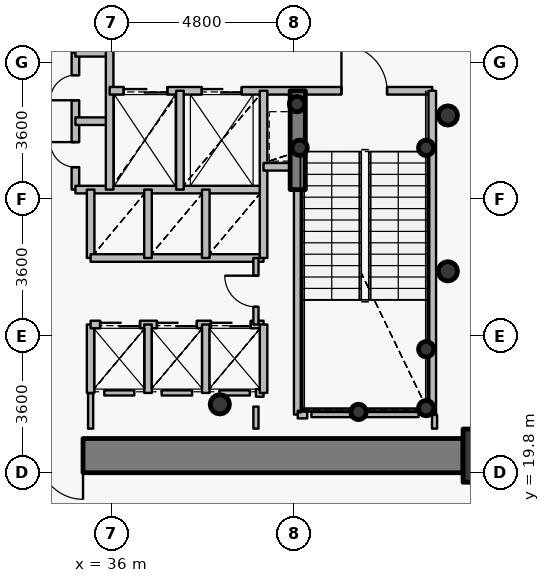
"""IFC4 building model, lengths in metres.
Left out: names, types, materials, properties, quantities, classifications, styles, units other than length and angle.
Written with IfcOpenShell. Run it as: python <this file> out.ifc"""

import sys

from ifc_helpers import new_model, si_unit, direction, frame, frame_2d, origin, origin_2d, place, context, subcontext, project, spatial, rectangle, hollow_circle, extrude, source, transform, mapped, element, fill, save


model = new_model("IFC4")
c1 = context("Model", 3, precision=1e-05, world=origin(), true_north=direction((0.0, 1.0)))
c2 = subcontext(c1, "Body", "Model", "MODEL_VIEW")
j1 = project(units=[si_unit("LENGTHUNIT", "METRE"), si_unit("PLANEANGLEUNIT", "RADIAN")], contexts=[c1])
p1 = place(None, origin())
s1 = spatial("IfcSite", under=j1, at=p1, CompositionType="ELEMENT")
p2 = place(p1, origin())
s2 = spatial("IfcBuilding", under=s1, at=p2, CompositionType="ELEMENT")
p3 = place(p2, frame((0.0, 0.0, 70.2)))
s3 = spatial("IfcBuildingStorey", under=s2, at=p3, CompositionType="ELEMENT", Elevation=70.2)
p4 = place(p3, frame((45.95, 20.25, 0.0), z_axis=(0.0, 0.0, 1.0), x_axis=(1.0, 0.0, 0.0)))
e1 = element("IfcColumn", 1, at=p4, inside=s3, PredefinedType="COLUMN", context=c2, shape_type="SweptSolid", body=[
    extrude(rectangle(XDim=1.4, YDim=1.4, at=origin_2d()), origin(), (0.0, 0.0, 1.0), 4.2),
])
p5 = place(p3, frame((38.85, 21.6, 0.0), z_axis=(0.0, 0.0, 1.0), x_axis=(1.0, 0.0, 0.0)))
e2 = element("IfcColumn", 2, at=p5, inside=s3, PredefinedType="COLUMN", context=c2, shape_type="SweptSolid", body=[
    extrude(hollow_circle(Radius=0.254, WallThickness=0.02, at=origin_2d()), origin(), (0.0, 0.0, 1.0), 4.2),
])
for number, where, z_axis, x_axis in (
    (3, (44.28, 21.5, 0.0), (0.0, 0.0, 1.0), (1.0, 0.0, 0.0)),
    (4, (44.28, 23.05, 0.0), (0.0, 0.0, 1.0), (1.0, 0.0, 0.0)),
    (5, (42.5, 21.4, 0.0), (0.0, 0.0, 1.0), (1.0, 0.0, 0.0)),
    (6, (40.95, 28.35, 0.0), (0.0, 0.0, 1.0), (1.0, 0.0, 0.0)),
    (7, (44.28, 28.35, 0.0), (0.0, 0.0, 1.0), (1.0, 0.0, 0.0)),
    (8, (40.88, 29.5, 0.0), (0.0, 0.0, 1.0), (1.0, 0.0, 0.0)),
):
    element("IfcColumn", number, at=place(p3, frame(where, z_axis=z_axis, x_axis=x_axis)), inside=s3, PredefinedType="COLUMN", context=c2, shape_type="SweptSolid", body=[
        extrude(hollow_circle(Radius=0.203, WallThickness=0.016, at=origin_2d()), origin(), (0.0, 0.0, 1.0), 4.2),
    ])
p6 = place(p3, frame((45.25, 20.25, 0.0), z_axis=(0.0, 0.0, 1.0), x_axis=(-1.0, 0.0, 0.0)))
e9 = element("IfcWall", 9, at=p6, inside=s3, PredefinedType="SHEAR", context=c2, shape_type="SweptSolid", body=[
    extrude(rectangle(XDim=18.5, YDim=0.9, at=frame_2d((9.25, 0.0))), origin(), (0.0, 0.0, 1.0), 3.4),
])
p7 = place(p6, frame((10.0, 0.0, 0.0)))
e10 = element("IfcOpeningElement", 10, at=p7, cuts=e9, PredefinedType="OPENING", context=c2, shape_type="SweptSolid", body=[
    extrude(rectangle(XDim=1.15, YDim=2.15, at=origin_2d()), frame((0.575, 0.46, 1.075), z_axis=(0.0, -1.0, 0.0), x_axis=(1.0, 0.0, 0.0)), (0.0, 0.0, 1.0), 0.92),
])
p8 = place(p3, frame((40.9, 27.25, 0.0), z_axis=(0.0, 0.0, 1.0), x_axis=(0.0, 1.0, 0.0)))
e11 = element("IfcWall", 11, at=p8, inside=s3, PredefinedType="SHEAR", context=c2, shape_type="SweptSolid", body=[
    extrude(rectangle(XDim=2.6, YDim=0.4, at=frame_2d((1.3, 0.0))), origin(), (0.0, 0.0, 1.0), 3.55),
])
for number, where, z_axis, x_axis in (
    (12, (44.85, 25.1, 0.0), (0.0, 0.0, 1.0), (1.0, 0.0, 0.0)),
    (13, (44.85, 29.2, 0.0), (0.0, 0.0, 1.0), (1.0, 0.0, 0.0)),
):
    element("IfcColumn", number, at=place(p3, frame(where, z_axis=z_axis, x_axis=x_axis)), inside=s3, PredefinedType="COLUMN", context=c2, shape_type="SweptSolid", body=[
        extrude(hollow_circle(Radius=0.254, WallThickness=0.02, at=origin_2d()), origin(), (0.0, 0.0, 1.0), 4.2),
    ])
p9 = place(p3, frame((35.05, 27.25, 0.0), z_axis=(0.0, 0.0, 1.0), x_axis=(0.0, 1.0, 0.0)))
e14 = element("IfcWall", 14, at=p9, inside=s3, PredefinedType="PARTITIONING", context=c2, shape_type="SweptSolid", body=[
    extrude(rectangle(XDim=3.6, YDim=0.2, at=frame_2d((1.8, 0.0))), origin(), (0.0, 0.0, 1.0), 3.95),
])
p10 = place(p9, frame((0.59, 0.0, 0.0)))
e15 = element("IfcOpeningElement", 15, at=p10, cuts=e14, PredefinedType="OPENING", context=c2, shape_type="SweptSolid", body=[
    extrude(rectangle(XDim=0.66, YDim=2.05, at=origin_2d()), frame((0.33, 0.11, 1.025), z_axis=(0.0, -1.0, 0.0), x_axis=(1.0, 0.0, 0.0)), (0.0, 0.0, 1.0), 0.22),
])
p11 = place(p9, frame((2.35, 0.0, 0.0)))
e16 = element("IfcOpeningElement", 16, at=p11, cuts=e14, PredefinedType="OPENING", context=c2, shape_type="SweptSolid", body=[
    extrude(rectangle(XDim=0.66, YDim=2.05, at=origin_2d()), frame((0.33, 0.11, 1.025), z_axis=(0.0, -1.0, 0.0), x_axis=(1.0, 0.0, 0.0)), (0.0, 0.0, 1.0), 0.22),
])
p12 = place(p3, frame((35.05, 27.25, 0.0), z_axis=(0.0, 0.0, 1.0), x_axis=(1.0, 0.0, 0.0)))
e17 = element("IfcWall", 17, at=p12, inside=s3, PredefinedType="PARTITIONING", context=c2, shape_type="SweptSolid", body=[
    extrude(rectangle(XDim=4.95, YDim=0.2, at=frame_2d((2.475, 0.0))), origin(), (0.0, 0.0, 1.0), 3.535),
])
for number, where, z_axis, x_axis in (
    (18, (35.05, 29.05, 0.0), (0.0, 0.0, 1.0), (1.0, 0.0, 0.0)),
    (19, (35.05, 30.85, 0.0), (0.0, 0.0, 1.0), (1.0, 0.0, 0.0)),
):
    element("IfcWall", number, at=place(p3, frame(where, z_axis=z_axis, x_axis=x_axis)), inside=s3, PredefinedType="PARTITIONING", context=c2, shape_type="SweptSolid", body=[
        extrude(rectangle(XDim=0.9, YDim=0.2, at=frame_2d((0.45, 0.0))), origin(), (0.0, 0.0, 1.0), 3.95),
    ])
p13 = place(p3, frame((35.45, 21.9, 0.0), z_axis=(0.0, 0.0, 1.0), x_axis=(0.0, 1.0, 0.0)))
e20 = element("IfcWall", 20, at=p13, inside=s3, PredefinedType="PARTITIONING", context=c2, shape_type="SweptSolid", body=[
    extrude(rectangle(XDim=1.8, YDim=0.2, at=frame_2d((0.9, 0.0))), origin(), (0.0, 0.0, 1.0), 3.95),
])
p14 = place(p3, frame((35.45, 23.7, 0.0), z_axis=(0.0, 0.0, 1.0), x_axis=(1.0, 0.0, 0.0)))
e21 = element("IfcWall", 21, at=p14, inside=s3, PredefinedType="PARTITIONING", context=c2, shape_type="SweptSolid", body=[
    extrude(rectangle(XDim=4.55, YDim=0.2, at=frame_2d((2.275, 0.0))), origin(), (0.0, 0.0, 1.0), 3.535),
])
p15 = place(p14, frame((0.25, 0.0, 0.0)))
e22 = element("IfcOpeningElement", 22, at=p15, cuts=e21, PredefinedType="OPENING", context=c2, shape_type="SweptSolid", body=[
    extrude(rectangle(XDim=1.05, YDim=2.15, at=origin_2d()), frame((0.525, 0.11, 1.075), z_axis=(0.0, -1.0, 0.0), x_axis=(1.0, 0.0, 0.0)), (0.0, 0.0, 1.0), 0.22),
])
p16 = place(p14, frame((1.745, 0.0, 0.0)))
e23 = element("IfcOpeningElement", 23, at=p16, cuts=e21, PredefinedType="OPENING", context=c2, shape_type="SweptSolid", body=[
    extrude(rectangle(XDim=1.05, YDim=2.15, at=origin_2d()), frame((0.525, 0.11, 1.075), z_axis=(0.0, -1.0, 0.0), x_axis=(1.0, 0.0, 0.0)), (0.0, 0.0, 1.0), 0.22),
])
p17 = place(p14, frame((3.165, 0.0, 0.0)))
e24 = element("IfcOpeningElement", 24, at=p17, cuts=e21, PredefinedType="OPENING", context=c2, shape_type="SweptSolid", body=[
    extrude(rectangle(XDim=1.05, YDim=2.15, at=origin_2d()), frame((0.525, 0.11, 1.075), z_axis=(0.0, -1.0, 0.0), x_axis=(1.0, 0.0, 0.0)), (0.0, 0.0, 1.0), 0.22),
])
p18 = place(p3, frame((35.45, 25.45, 0.0), z_axis=(0.0, 0.0, 1.0), x_axis=(0.0, 1.0, 0.0)))
e25 = element("IfcWall", 25, at=p18, inside=s3, PredefinedType="PARTITIONING", context=c2, shape_type="SweptSolid", body=[
    extrude(rectangle(XDim=1.8, YDim=0.2, at=frame_2d((0.9, 0.0))), origin(), (0.0, 0.0, 1.0), 3.95),
])
p19 = place(p3, frame((35.45, 25.45, 0.0), z_axis=(0.0, 0.0, 1.0), x_axis=(1.0, 0.0, 0.0)))
e26 = element("IfcWall", 26, at=p19, inside=s3, PredefinedType="PARTITIONING", context=c2, shape_type="SweptSolid", body=[
    extrude(rectangle(XDim=4.55, YDim=0.2, at=frame_2d((2.275, 0.0))), origin(), (0.0, 0.0, 1.0), 3.535),
])
p20 = place(p3, frame((35.95, 27.25, 0.0), z_axis=(0.0, 0.0, 1.0), x_axis=(0.0, 1.0, 0.0)))
e27 = element("IfcWall", 27, at=p20, inside=s3, PredefinedType="PARTITIONING", context=c2, shape_type="SweptSolid", body=[
    extrude(rectangle(XDim=3.8, YDim=0.2, at=frame_2d((1.9, 0.0))), origin(), (0.0, 0.0, 1.0), 3.95),
])
p21 = place(p3, frame((35.95, 29.85, 0.0), z_axis=(0.0, 0.0, 1.0), x_axis=(1.0, 0.0, 0.0)))
e28 = element("IfcWall", 28, at=p21, inside=s3, PredefinedType="PARTITIONING", context=c2, shape_type="SweptSolid", body=[
    extrude(rectangle(XDim=8.49, YDim=0.2, at=frame_2d((4.245, 0.0))), origin(), (0.0, 0.0, 1.0), 3.535),
])
p22 = place(p21, frame((6.1, 0.0, 0.0)))
e29 = element("IfcOpeningElement", 29, at=p22, cuts=e28, PredefinedType="OPENING", context=c2, shape_type="SweptSolid", body=[
    extrude(rectangle(XDim=1.2, YDim=2.15, at=origin_2d()), frame((0.6, 0.11, 1.075), z_axis=(0.0, -1.0, 0.0), x_axis=(1.0, 0.0, 0.0)), (0.0, 0.0, 1.0), 0.22),
])
p23 = place(p21, frame((0.37, 0.0, 0.0)))
e30 = element("IfcOpeningElement", 30, at=p23, cuts=e28, PredefinedType="OPENING", context=c2, shape_type="SweptSolid", body=[
    extrude(rectangle(XDim=1.15, YDim=2.15, at=origin_2d()), frame((0.575, 0.11, 1.075), z_axis=(0.0, -1.0, 0.0), x_axis=(1.0, 0.0, 0.0)), (0.0, 0.0, 1.0), 0.22),
])
p24 = place(p21, frame((2.425, 0.0, 0.0)))
e31 = element("IfcOpeningElement", 31, at=p24, cuts=e28, PredefinedType="OPENING", context=c2, shape_type="SweptSolid", body=[
    extrude(rectangle(XDim=1.05, YDim=2.15, at=origin_2d()), frame((0.525, 0.11, 1.075), z_axis=(0.0, -1.0, 0.0), x_axis=(1.0, 0.0, 0.0)), (0.0, 0.0, 1.0), 0.22),
])
for number, where, z_axis, x_axis in (
    (32, (36.96, 21.9, 0.0), (0.0, 0.0, 1.0), (0.0, 1.0, 0.0)),
    (33, (36.96, 25.45, 0.0), (0.0, 0.0, 1.0), (0.0, 1.0, 0.0)),
):
    element("IfcWall", number, at=place(p3, frame(where, z_axis=z_axis, x_axis=x_axis)), inside=s3, PredefinedType="PARTITIONING", context=c2, shape_type="SweptSolid", body=[
        extrude(rectangle(XDim=1.8, YDim=0.2, at=frame_2d((0.9, 0.0))), origin(), (0.0, 0.0, 1.0), 3.95),
    ])
p25 = place(p3, frame((37.8, 27.25, 0.0), z_axis=(0.0, 0.0, 1.0), x_axis=(0.0, 1.0, 0.0)))
e34 = element("IfcWall", 34, at=p25, inside=s3, PredefinedType="PARTITIONING", context=c2, shape_type="SweptSolid", body=[
    extrude(rectangle(XDim=2.6, YDim=0.2, at=frame_2d((1.3, 0.0))), origin(), (0.0, 0.0, 1.0), 3.95),
])
for number, where, z_axis, x_axis in (
    (35, (38.48, 21.9, 0.0), (0.0, 0.0, 1.0), (0.0, 1.0, 0.0)),
    (36, (38.48, 25.45, 0.0), (0.0, 0.0, 1.0), (0.0, 1.0, 0.0)),
):
    element("IfcWall", number, at=place(p3, frame(where, z_axis=z_axis, x_axis=x_axis)), inside=s3, PredefinedType="PARTITIONING", context=c2, shape_type="SweptSolid", body=[
        extrude(rectangle(XDim=1.8, YDim=0.2, at=frame_2d((0.9, 0.0))), origin(), (0.0, 0.0, 1.0), 3.95),
    ])
p26 = place(p3, frame((39.8, 21.9, 0.0), z_axis=(0.0, 0.0, 1.0), x_axis=(1.0, 0.0, 0.0)))
e37 = element("IfcWall", 37, at=p26, inside=s3, PredefinedType="PARTITIONING", context=c2, shape_type="SweptSolid", body=[
    extrude(rectangle(XDim=0.2, YDim=0.2, at=frame_2d((0.1, 0.0))), origin(), (0.0, 0.0, 1.0), 3.95),
])
p27 = place(p3, frame((39.8, 23.7, 0.0), z_axis=(0.0, 0.0, 1.0), x_axis=(0.0, 1.0, 0.0)))
e38 = element("IfcWall", 38, at=p27, inside=s3, PredefinedType="PARTITIONING", context=c2, shape_type="SweptSolid", body=[
    extrude(rectangle(XDim=1.75, YDim=0.135, at=frame_2d((0.875, 0.0))), origin(), (0.0, 0.0, 1.0), 3.95),
])
p28 = place(p27, frame((0.465, 0.0, 0.0)))
e39 = element("IfcOpeningElement", 39, at=p28, cuts=e38, PredefinedType="OPENING", context=c2, shape_type="SweptSolid", body=[
    extrude(rectangle(XDim=0.82, YDim=2.1, at=origin_2d()), frame((0.41, 0.078, 1.05), z_axis=(0.0, -1.0, 0.0), x_axis=(1.0, 0.0, 0.0)), (0.0, 0.0, 1.0), 0.155),
])
p29 = place(p3, frame((40.0, 21.9, 0.0), z_axis=(0.0, 0.0, 1.0), x_axis=(0.0, 1.0, 0.0)))
e40 = element("IfcWall", 40, at=p29, inside=s3, PredefinedType="PARTITIONING", context=c2, shape_type="SweptSolid", body=[
    extrude(rectangle(XDim=1.8, YDim=0.2, at=frame_2d((0.9, 0.0))), origin(), (0.0, 0.0, 1.0), 3.95),
])
p30 = place(p3, frame((40.0, 25.45, 0.0), z_axis=(0.0, 0.0, 1.0), x_axis=(0.0, 1.0, 0.0)))
e41 = element("IfcWall", 41, at=p30, inside=s3, PredefinedType="PARTITIONING", context=c2, shape_type="SweptSolid", body=[
    extrude(rectangle(XDim=4.4, YDim=0.2, at=frame_2d((2.2, 0.0))), origin(), (0.0, 0.0, 1.0), 3.95),
])
p31 = place(p3, frame((40.0, 27.85, 0.0), z_axis=(0.0, 0.0, 1.0), x_axis=(1.0, 0.0, 0.0)))
e42 = element("IfcWall", 42, at=p31, inside=s3, PredefinedType="PARTITIONING", context=c2, shape_type="SweptSolid", body=[
    extrude(rectangle(XDim=0.9, YDim=0.2, at=frame_2d((0.45, 0.0))), origin(), (0.0, 0.0, 1.0), 3.95),
])
p32 = place(p3, frame((40.9, 21.33, 0.0), z_axis=(0.0, 0.0, 1.0), x_axis=(0.0, 1.0, 0.0)))
e43 = element("IfcWall", 43, at=p32, inside=s3, PredefinedType="PARTITIONING", context=c2, shape_type="SweptSolid", body=[
    extrude(rectangle(XDim=5.91, YDim=0.2, at=frame_2d((2.955, 0.0))), origin(), (0.0, 0.0, 1.0), 3.485),
])
p33 = place(p3, frame((40.9, 21.33, 0.0), z_axis=(0.0, 0.0, 1.0), x_axis=(1.0, 0.0, 0.0)))
e44 = element("IfcWall", 44, at=p33, inside=s3, PredefinedType="PARTITIONING", context=c2, shape_type="SweptSolid", body=[
    extrude(rectangle(XDim=0.25, YDim=0.2, at=frame_2d((0.125, 0.0))), origin(), (0.0, 0.0, 1.0), 3.485),
])
p34 = place(p3, frame((44.44, 21.33, 0.0), z_axis=(0.0, 0.0, 1.0), x_axis=(0.0, 1.0, 0.0)))
e45 = element("IfcWall", 45, at=p34, inside=s3, PredefinedType="PARTITIONING", context=c2, shape_type="SweptSolid", body=[
    extrude(rectangle(XDim=8.52, YDim=0.2, at=frame_2d((4.26, 0.0))), origin(), (0.0, 0.0, 1.0), 3.95),
])
p35 = place(p3, frame((44.08, 21.33, 0.0), z_axis=(0.0, 0.0, 1.0), x_axis=(-1.0, 0.0, 0.0)))
e46 = element("IfcWall", 46, at=p35, inside=s3, PredefinedType="PARTITIONING", context=c2, shape_type="SweptSolid", body=[
    extrude(rectangle(XDim=2.82, YDim=0.135, at=frame_2d((1.41, 0.0))), origin(), (0.0, 0.0, 1.0), 3.485),
])
p36 = place(p3, frame((36.6, 21.9, 0.0), z_axis=(0.0, 0.0, 1.0), x_axis=(-1.0, 0.0, 0.0)))
e47 = element("IfcWall", 47, at=p36, inside=s3, PredefinedType="PARTITIONING", context=c2, shape_type="SweptSolid", body=[
    extrude(rectangle(XDim=0.79, YDim=0.135, at=frame_2d((0.395, 0.0))), origin(), (0.0, 0.0, 1.0), 3.95),
])
p37 = place(p3, frame((38.12, 21.9, 0.0), z_axis=(0.0, 0.0, 1.0), x_axis=(-1.0, 0.0, 0.0)))
e48 = element("IfcWall", 48, at=p37, inside=s3, PredefinedType="PARTITIONING", context=c2, shape_type="SweptSolid", body=[
    extrude(rectangle(XDim=0.8, YDim=0.135, at=frame_2d((0.4, 0.0))), origin(), (0.0, 0.0, 1.0), 3.95),
])
p38 = place(p3, frame((39.64, 21.9, 0.0), z_axis=(0.0, 0.0, 1.0), x_axis=(-1.0, 0.0, 0.0)))
e49 = element("IfcWall", 49, at=p38, inside=s3, PredefinedType="PARTITIONING", context=c2, shape_type="SweptSolid", body=[
    extrude(rectangle(XDim=0.8, YDim=0.135, at=frame_2d((0.4, 0.0))), origin(), (0.0, 0.0, 1.0), 3.535),
])
p39 = place(p3, frame((39.8, 20.96, 0.0), z_axis=(0.0, 0.0, 1.0), x_axis=(0.0, 1.0, 0.0)))
e50 = element("IfcWall", 50, at=p39, inside=s3, PredefinedType="PARTITIONING", context=c2, shape_type="SweptSolid", body=[
    extrude(rectangle(XDim=0.58, YDim=0.135, at=frame_2d((0.29, 0.0))), origin(), (0.0, 0.0, 1.0), 3.485),
])
p40 = place(p3, frame((44.5, 20.96, 0.0), z_axis=(0.0, 0.0, 1.0), x_axis=(0.0, 1.0, 0.0)))
e51 = element("IfcWall", 51, at=p40, inside=s3, PredefinedType="PARTITIONING", context=c2, shape_type="SweptSolid", body=[
    extrude(rectangle(XDim=0.36, YDim=0.135, at=frame_2d((0.18, 0.0))), origin(), (0.0, 0.0, 1.0), 3.95),
])
p41 = place(p3, frame((35.45, 21.89, 0.0), z_axis=(0.0, 0.0, 1.0), x_axis=(0.0, -1.0, 0.0)))
e52 = element("IfcWall", 52, at=p41, inside=s3, PredefinedType="PARTITIONING", context=c2, shape_type="SweptSolid", body=[
    extrude(rectangle(XDim=0.93, YDim=0.135, at=frame_2d((0.465, 0.0))), origin(), (0.0, 0.0, 1.0), 3.535),
])
p42 = place(p3, frame((45.26, 19.8, 0.0), z_axis=(0.0, 0.0, 1.0), x_axis=(1.0, 0.0, 0.0)))
e53 = element("IfcWall", 53, at=p42, inside=s3, PredefinedType="PARTITIONING", context=c2, shape_type="SweptSolid", body=[
    extrude(rectangle(XDim=1.14, YDim=0.135, at=frame_2d((0.57, 0.0))), origin(), (0.0, 0.0, 1.0), 3.285),
])
m1 = source(origin(), c2, "Body", "SweptSolid", [
    extrude(rectangle(XDim=1.15, YDim=2.15, at=origin_2d()), frame((0.575, 0.025, 1.075), z_axis=(0.0, -1.0, 0.0), x_axis=(1.0, 0.0, 0.0)), (0.0, 0.0, 1.0), 0.05),
])
p43 = place(p7, origin())
e54 = element("IfcDoor", 54, at=p43, inside=s3, OperationType="SINGLE_SWING_LEFT", PredefinedType="DOOR", context=c2, shape_type="MappedRepresentation", body=[
    mapped(m1, transform((0.0, 0.0, 0.0), x_axis=(1.0, 0.0, 0.0), y_axis=(0.0, 1.0, 0.0), z_axis=(0.0, 0.0, 1.0), scale=1.0)),
])
fill(e10, e54)
m2 = source(origin(), c2, "Body", "SweptSolid", [
    extrude(rectangle(XDim=1.2, YDim=2.15, at=origin_2d()), frame((0.6, 0.025, 1.075), z_axis=(0.0, -1.0, 0.0), x_axis=(1.0, 0.0, 0.0)), (0.0, 0.0, 1.0), 0.05),
])
p44 = place(p22, origin())
e55 = element("IfcDoor", 55, at=p44, inside=s3, OperationType="SINGLE_SWING_LEFT", PredefinedType="DOOR", context=c2, shape_type="MappedRepresentation", body=[
    mapped(m2, transform((0.0, 0.0, 0.0), x_axis=(1.0, 0.0, 0.0), y_axis=(0.0, 1.0, 0.0), z_axis=(0.0, 0.0, 1.0), scale=1.0)),
])
fill(e29, e55)
m3 = source(origin(), c2, "Body", "SweptSolid", [
    extrude(rectangle(XDim=1.15, YDim=2.15, at=origin_2d()), frame((0.575, 0.025, 1.075), z_axis=(0.0, -1.0, 0.0), x_axis=(1.0, 0.0, 0.0)), (0.0, 0.0, 1.0), 0.05),
])
p45 = place(p23, origin())
e56 = element("IfcDoor", 56, at=p45, inside=s3, OperationType="DOUBLE_DOOR_SLIDING", PredefinedType="USERDEFINED", context=c2, shape_type="MappedRepresentation", body=[
    mapped(m3, transform((0.0, 0.0, 0.0), x_axis=(1.0, 0.0, 0.0), y_axis=(0.0, 1.0, 0.0), z_axis=(0.0, 0.0, 1.0), scale=1.0)),
])
fill(e30, e56)
m4 = source(origin(), c2, "Body", "SweptSolid", [
    extrude(rectangle(XDim=1.05, YDim=2.15, at=origin_2d()), frame((0.525, 0.025, 1.075), z_axis=(0.0, -1.0, 0.0), x_axis=(1.0, 0.0, 0.0)), (0.0, 0.0, 1.0), 0.05),
])
p46 = place(p24, origin())
e57 = element("IfcDoor", 57, at=p46, inside=s3, OperationType="DOUBLE_DOOR_SLIDING", PredefinedType="USERDEFINED", context=c2, shape_type="MappedRepresentation", body=[
    mapped(m4, transform((0.0, 0.0, 0.0), x_axis=(1.0, 0.0, 0.0), y_axis=(0.0, 1.0, 0.0), z_axis=(0.0, 0.0, 1.0), scale=1.0)),
])
fill(e31, e57)
p47 = place(p15, origin())
e58 = element("IfcDoor", 58, at=p47, inside=s3, OperationType="DOUBLE_DOOR_SLIDING", PredefinedType="USERDEFINED", context=c2, shape_type="MappedRepresentation", body=[
    mapped(m4, transform((0.0, 0.0, 0.0), x_axis=(1.0, 0.0, 0.0), y_axis=(0.0, 1.0, 0.0), z_axis=(0.0, 0.0, 1.0), scale=1.0)),
])
fill(e22, e58)
p48 = place(p16, origin())
e59 = element("IfcDoor", 59, at=p48, inside=s3, OperationType="DOUBLE_DOOR_SLIDING", PredefinedType="USERDEFINED", context=c2, shape_type="MappedRepresentation", body=[
    mapped(m4, transform((0.0, 0.0, 0.0), x_axis=(1.0, 0.0, 0.0), y_axis=(0.0, 1.0, 0.0), z_axis=(0.0, 0.0, 1.0), scale=1.0)),
])
fill(e23, e59)
p49 = place(p17, origin())
e60 = element("IfcDoor", 60, at=p49, inside=s3, OperationType="DOUBLE_DOOR_SLIDING", PredefinedType="USERDEFINED", context=c2, shape_type="MappedRepresentation", body=[
    mapped(m4, transform((0.0, 0.0, 0.0), x_axis=(1.0, 0.0, 0.0), y_axis=(0.0, 1.0, 0.0), z_axis=(0.0, 0.0, 1.0), scale=1.0)),
])
fill(e24, e60)
m5 = source(origin(), c2, "Body", "SweptSolid", [
    extrude(rectangle(XDim=0.66, YDim=2.05, at=origin_2d()), frame((0.33, 0.025, 1.025), z_axis=(0.0, -1.0, 0.0), x_axis=(1.0, 0.0, 0.0)), (0.0, 0.0, 1.0), 0.05),
])
p50 = place(p10, origin())
e61 = element("IfcDoor", 61, at=p50, inside=s3, OperationType="SINGLE_SWING_RIGHT", PredefinedType="USERDEFINED", context=c2, shape_type="MappedRepresentation", body=[
    mapped(m5, transform((0.0, 0.0, 0.0), x_axis=(1.0, 0.0, 0.0), y_axis=(0.0, 1.0, 0.0), z_axis=(0.0, 0.0, 1.0), scale=1.0)),
])
fill(e15, e61)
p51 = place(p11, origin())
e62 = element("IfcDoor", 62, at=p51, inside=s3, OperationType="SINGLE_SWING_LEFT", PredefinedType="USERDEFINED", context=c2, shape_type="MappedRepresentation", body=[
    mapped(m5, transform((0.0, 0.0, 0.0), x_axis=(1.0, 0.0, 0.0), y_axis=(0.0, 1.0, 0.0), z_axis=(0.0, 0.0, 1.0), scale=1.0)),
])
fill(e16, e62)
m6 = source(origin(), c2, "Body", "SweptSolid", [
    extrude(rectangle(XDim=0.82, YDim=2.1, at=origin_2d()), frame((0.41, 0.025, 1.05), z_axis=(0.0, -1.0, 0.0), x_axis=(1.0, 0.0, 0.0)), (0.0, 0.0, 1.0), 0.05),
])
p52 = place(p28, origin())
e63 = element("IfcDoor", 63, at=p52, inside=s3, OperationType="SINGLE_SWING_RIGHT", PredefinedType="DOOR", context=c2, shape_type="MappedRepresentation", body=[
    mapped(m6, transform((0.0, 0.0, 0.0), x_axis=(1.0, 0.0, 0.0), y_axis=(0.0, 1.0, 0.0), z_axis=(0.0, 0.0, 1.0), scale=1.0)),
])
fill(e39, e63)
save(model, sys.argv[1])
